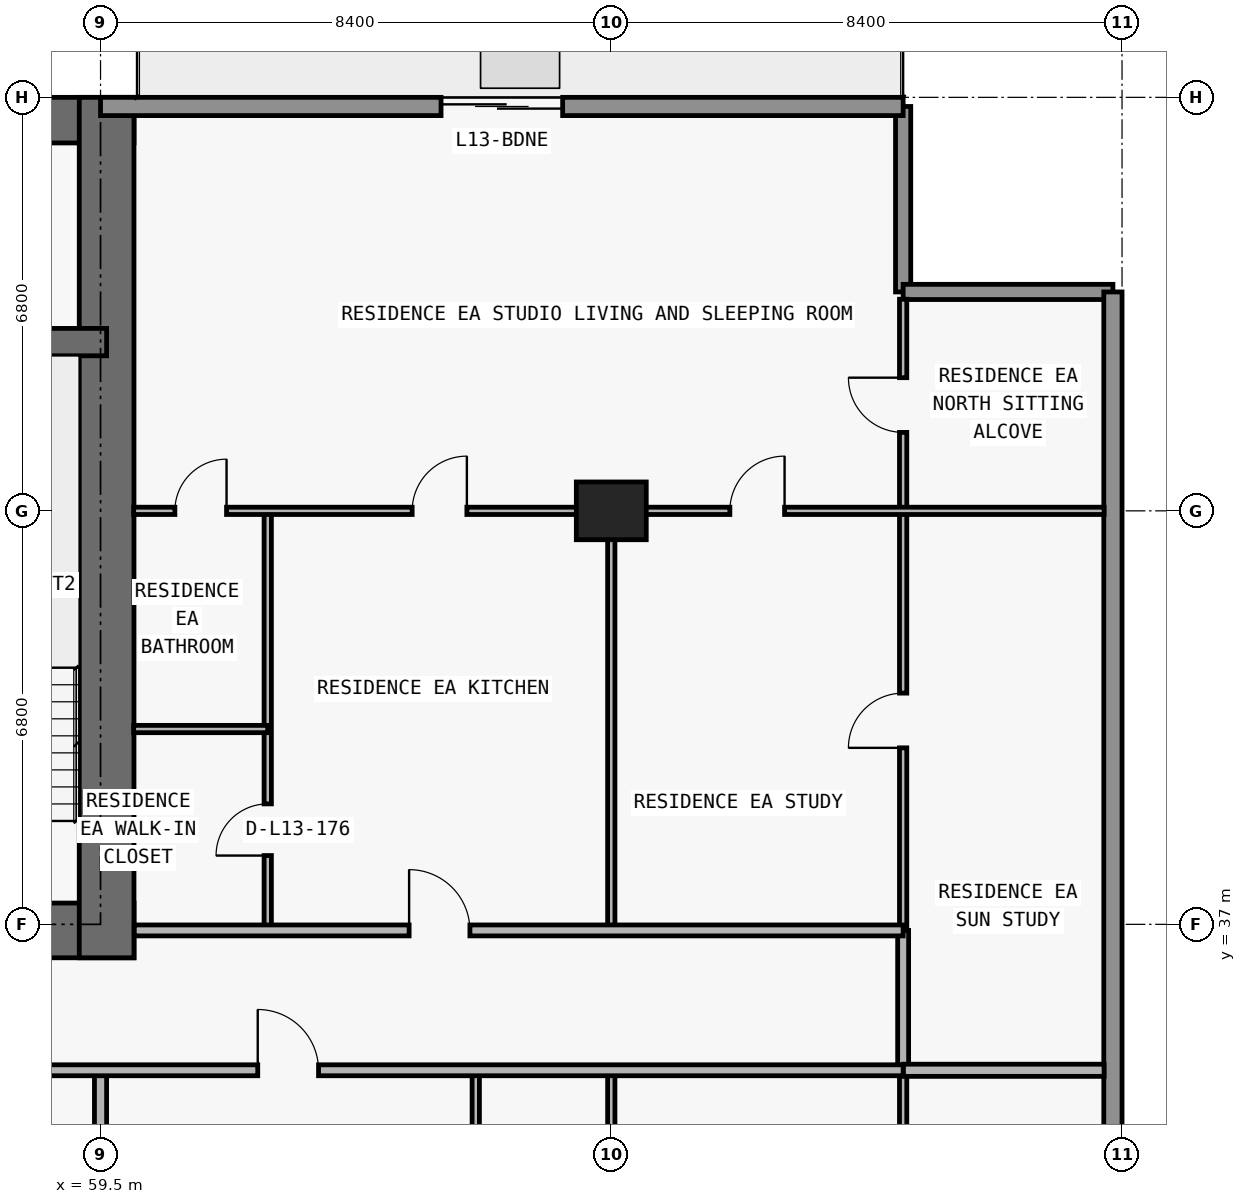
"""IFC4 building model, lengths in metres.
Left out: names, types, materials, properties, quantities, classifications, styles, units other than length and angle.
Written with IfcOpenShell. Run it as: python <this file> out.ifc"""

import sys

from ifc_helpers import new_model, si_unit, direction, frame, frame_2d, origin, origin_2d, place, context, subcontext, project, spatial, rectangle, extrude, element, fill, save


model = new_model("IFC4")
c1 = context("Model", 3, precision=1e-05, world=origin(), true_north=direction((0.0, 1.0)))
c2 = subcontext(c1, "Body", "Model", "MODEL_VIEW")
j1 = project(units=[si_unit("LENGTHUNIT", "METRE"), si_unit("PLANEANGLEUNIT", "RADIAN")], contexts=[c1])
p1 = place(None, origin())
s1 = spatial("IfcSite", under=j1, at=p1, CompositionType="ELEMENT")
p2 = place(p1, origin())
s2 = spatial("IfcBuilding", under=s1, at=p2, CompositionType="ELEMENT")
p3 = place(p2, frame((0.0, 0.0, 53.1)))
s3 = spatial("IfcBuildingStorey", under=s2, at=p3, CompositionType="ELEMENT", Elevation=53.1)
p4 = place(p3, frame((67.9, 43.8, 0.0), z_axis=(0.0, 0.0, 1.0), x_axis=(1.0, 0.0, 0.0)))
e1 = element("IfcColumn", 1, at=p4, inside=s3, PredefinedType="COLUMN", context=c2, shape_type="SweptSolid", body=[
    extrude(rectangle(XDim=1.15, YDim=0.95, at=origin_2d()), origin(), (0.0, 0.0, 1.0), 3.05),
])
p5 = place(p3, frame((17.75, 36.9, 0.0), z_axis=(0.0, 0.0, 1.0), x_axis=(1.0, 0.0, 0.0)))
e2 = element("IfcWall", 2, at=p5, inside=s3, PredefinedType="SHEAR", context=c2, shape_type="SweptSolid", body=[
    extrude(rectangle(XDim=42.3, YDim=0.9, at=frame_2d((21.15, 0.0))), origin(), (0.0, 0.0, 1.0), 3.05),
])
p6 = place(p5, frame((14.55, 0.0, 0.0)))
e3 = element("IfcOpeningElement", 3, at=p6, cuts=e2, PredefinedType="OPENING", context=c2, shape_type="SweptSolid", body=[
    extrude(rectangle(XDim=1.1, YDim=2.15, at=frame_2d((0.55, 1.075))), frame((0.0, 0.46, 0.0), z_axis=(0.0, -1.0, 0.0), x_axis=(1.0, 0.0, 0.0)), (0.0, 0.0, 1.0), 0.92),
])
p7 = place(p5, frame((6.4, 0.0, 0.0)))
e4 = element("IfcOpeningElement", 4, at=p7, cuts=e2, PredefinedType="OPENING", context=c2, shape_type="SweptSolid", body=[
    extrude(rectangle(XDim=1.05, YDim=2.15, at=frame_2d((0.525, 1.075))), frame((0.0, 0.46, 0.0), z_axis=(0.0, -1.0, 0.0), x_axis=(1.0, 0.0, 0.0)), (0.0, 0.0, 1.0), 0.92),
])
p8 = place(p5, frame((34.9, 0.0, 0.0)))
e5 = element("IfcOpeningElement", 5, at=p8, cuts=e2, PredefinedType="OPENING", context=c2, shape_type="SweptSolid", body=[
    extrude(rectangle(XDim=1.05, YDim=2.15, at=frame_2d((0.525, 1.075))), frame((0.0, 0.46, 0.0), z_axis=(0.0, -1.0, 0.0), x_axis=(1.0, 0.0, 0.0)), (0.0, 0.0, 1.0), 0.92),
])
p9 = place(p5, frame((11.012, 0.0, 0.0)))
e6 = element("IfcOpeningElement", 6, at=p9, cuts=e2, PredefinedType="OPENING", context=c2, shape_type="SweptSolid", body=[
    extrude(rectangle(XDim=1.05, YDim=2.15, at=frame_2d((0.525, 1.075))), frame((0.0, 0.46, 0.0), z_axis=(0.0, -1.0, 0.0), x_axis=(1.0, 0.0, 0.0)), (0.0, 0.0, 1.0), 0.92),
])
p10 = place(p5, frame((24.25, 0.0, 0.0)))
e7 = element("IfcOpeningElement", 7, at=p10, cuts=e2, PredefinedType="OPENING", context=c2, shape_type="SweptSolid", body=[
    extrude(rectangle(XDim=1.05, YDim=2.15, at=frame_2d((0.525, 1.075))), frame((0.0, 0.46, 0.0), z_axis=(0.0, -1.0, 0.0), x_axis=(1.0, 0.0, 0.0)), (0.0, 0.0, 1.0), 0.92),
])
p11 = place(p3, frame((17.75, 50.225, 0.0), z_axis=(0.0, 0.0, 1.0), x_axis=(1.0, 0.0, 0.0)))
e8 = element("IfcWall", 8, at=p11, inside=s3, PredefinedType="SHEAR", context=c2, shape_type="SweptSolid", body=[
    extrude(rectangle(XDim=42.3, YDim=0.75, at=frame_2d((21.15, 0.0))), origin(), (0.0, 0.0, 1.0), 3.05),
])
p12 = place(p3, frame((59.6, 36.45, 0.0), z_axis=(0.0, 0.0, 1.0), x_axis=(0.0, 1.0, 0.0)))
e9 = element("IfcWall", 9, at=p12, inside=s3, PredefinedType="SHEAR", context=c2, shape_type="SweptSolid", body=[
    extrude(rectangle(XDim=14.15, YDim=0.9, at=frame_2d((7.075, 0.0))), origin(), (0.0, 0.0, 1.0), 3.05),
])
p13 = place(p3, frame((18.2, 46.575, 0.0), z_axis=(0.0, 0.0, 1.0), x_axis=(1.0, 0.0, 0.0)))
e10 = element("IfcWall", 10, at=p13, inside=s3, PredefinedType="SHEAR", context=c2, shape_type="SweptSolid", body=[
    extrude(rectangle(XDim=41.4, YDim=0.45, at=frame_2d((20.7, 0.0))), origin(), (0.0, 0.0, 1.0), 3.05),
])
p14 = place(p13, frame((7.675, 0.0, 0.0)))
e11 = element("IfcOpeningElement", 11, at=p14, cuts=e10, PredefinedType="OPENING", context=c2, shape_type="SweptSolid", body=[
    extrude(rectangle(XDim=1.05, YDim=2.15, at=frame_2d((0.525, 1.075))), frame((0.0, 0.235, 0.0), z_axis=(0.0, -1.0, 0.0), x_axis=(1.0, 0.0, 0.0)), (0.0, 0.0, 1.0), 0.47),
])
p15 = place(p13, frame((32.725, 0.0, 0.0)))
e12 = element("IfcOpeningElement", 12, at=p15, cuts=e10, PredefinedType="OPENING", context=c2, shape_type="SweptSolid", body=[
    extrude(rectangle(XDim=1.05, YDim=2.15, at=frame_2d((0.525, 1.075))), frame((0.0, 0.235, 0.0), z_axis=(0.0, -1.0, 0.0), x_axis=(1.0, 0.0, 0.0)), (0.0, 0.0, 1.0), 0.47),
])
p16 = place(p3, frame((72.7, 50.45, 0.0), z_axis=(0.0, 0.0, 1.0), x_axis=(0.0, -1.0, 0.0)))
e13 = element("IfcWall", 13, at=p16, inside=s3, PredefinedType="ELEMENTEDWALL", context=c2, shape_type="SweptSolid", body=[
    extrude(rectangle(XDim=3.05, YDim=0.25, at=frame_2d((1.525, 0.0))), origin(), (0.0, 0.0, 1.0), 3.05),
])
p17 = place(p3, frame((72.7, 47.4, 0.0), z_axis=(0.0, 0.0, 1.0), x_axis=(1.0, 0.0, 0.0)))
e14 = element("IfcWall", 14, at=p17, inside=s3, PredefinedType="ELEMENTEDWALL", context=c2, shape_type="SweptSolid", body=[
    extrude(rectangle(XDim=3.45, YDim=0.25, at=frame_2d((1.725, 0.0))), origin(), (0.0, 0.0, 1.0), 3.05),
])
p18 = place(p3, frame((76.15, 47.4, 0.0), z_axis=(0.0, 0.0, 1.0), x_axis=(0.0, -1.0, 0.0)))
e15 = element("IfcWall", 15, at=p18, inside=s3, PredefinedType="STANDARD", context=c2, shape_type="SweptSolid", body=[
    extrude(rectangle(XDim=20.6, YDim=0.3, at=frame_2d((10.3, 0.0))), origin(), (0.0, 0.0, 1.0), 3.05),
])
p19 = place(p3, frame((59.5, 50.45, 0.0), z_axis=(0.0, 0.0, 1.0), x_axis=(1.0, 0.0, 0.0)))
e16 = element("IfcWall", 16, at=p19, inside=s3, PredefinedType="STANDARD", context=c2, shape_type="SweptSolid", body=[
    extrude(rectangle(XDim=13.2, YDim=0.3, at=frame_2d((6.6, 0.0))), origin(), (0.0, 0.0, 1.0), 3.05),
])
p20 = place(p19, frame((5.6, 0.0, 0.0)))
e17 = element("IfcOpeningElement", 17, at=p20, cuts=e16, PredefinedType="OPENING", context=c2, shape_type="SweptSolid", body=[
    extrude(rectangle(XDim=2.0, YDim=2.3, at=frame_2d((1.0, 1.15))), frame((0.0, 0.16, 0.0), z_axis=(0.0, -1.0, 0.0), x_axis=(1.0, 0.0, 0.0)), (0.0, 0.0, 1.0), 0.32),
])
p21 = place(p3, frame((59.5, 30.04, 0.0), z_axis=(0.0, 0.0, 1.0), x_axis=(0.0, 1.0, 0.0)))
e18 = element("IfcWall", 18, at=p21, inside=s3, PredefinedType="PARTITIONING", context=c2, shape_type="SweptSolid", body=[
    extrude(rectangle(XDim=4.56, YDim=0.2, at=frame_2d((2.28, 0.0))), origin(), (0.0, 0.0, 1.0), 2.11),
])
p22 = place(p3, frame((62.25, 36.9, 0.0), z_axis=(0.0, 0.0, 1.0), x_axis=(0.0, 1.0, 0.0)))
e19 = element("IfcWall", 19, at=p22, inside=s3, PredefinedType="PARTITIONING", context=c2, shape_type="SweptSolid", body=[
    extrude(rectangle(XDim=6.9, YDim=0.12, at=frame_2d((3.45, 0.0))), origin(), (0.0, 0.0, 1.0), 3.05),
])
p23 = place(p22, frame((1.231, 0.0, 0.0)))
e20 = element("IfcOpeningElement", 20, at=p23, cuts=e19, PredefinedType="OPENING", context=c2, shape_type="SweptSolid", body=[
    extrude(rectangle(XDim=0.85, YDim=2.1, at=frame_2d((0.425, 1.05))), frame((0.0, 0.07, 0.0), z_axis=(0.0, -1.0, 0.0), x_axis=(1.0, 0.0, 0.0)), (0.0, 0.0, 1.0), 0.14),
])
p24 = place(p3, frame((65.671, 30.04, 0.0), z_axis=(0.0, 0.0, 1.0), x_axis=(0.0, 1.0, 0.0)))
e21 = element("IfcWall", 21, at=p24, inside=s3, PredefinedType="PARTITIONING", context=c2, shape_type="SweptSolid", body=[
    extrude(rectangle(XDim=4.56, YDim=0.12, at=frame_2d((2.28, 0.0))), origin(), (0.0, 0.0, 1.0), 2.578),
])
p25 = place(p24, frame((1.855, 0.0, 0.0)))
e22 = element("IfcOpeningElement", 22, at=p25, cuts=e21, PredefinedType="OPENING", context=c2, shape_type="SweptSolid", body=[
    extrude(rectangle(XDim=0.85, YDim=2.1, at=frame_2d((0.425, 1.05))), frame((0.0, 0.07, 0.0), z_axis=(0.0, -1.0, 0.0), x_axis=(1.0, 0.0, 0.0)), (0.0, 0.0, 1.0), 0.14),
])
p26 = place(p3, frame((67.9, 30.04, 0.0), z_axis=(0.0, 0.0, 1.0), x_axis=(0.0, 1.0, 0.0)))
e23 = element("IfcWall", 23, at=p26, inside=s3, PredefinedType="PARTITIONING", context=c2, shape_type="SweptSolid", body=[
    extrude(rectangle(XDim=4.56, YDim=0.12, at=frame_2d((2.28, 0.0))), origin(), (0.0, 0.0, 1.0), 2.11),
])
p27 = place(p3, frame((67.9, 36.9, 0.0), z_axis=(0.0, 0.0, 1.0), x_axis=(0.0, 1.0, 0.0)))
e24 = element("IfcWall", 24, at=p27, inside=s3, PredefinedType="PARTITIONING", context=c2, shape_type="SweptSolid", body=[
    extrude(rectangle(XDim=6.9, YDim=0.12, at=frame_2d((3.45, 0.0))), origin(), (0.0, 0.0, 1.0), 2.11),
])
p28 = place(p3, frame((72.7, 30.04, 0.0), z_axis=(0.0, 0.0, 1.0), x_axis=(0.0, 1.0, 0.0)))
e25 = element("IfcWall", 25, at=p28, inside=s3, PredefinedType="PARTITIONING", context=c2, shape_type="SweptSolid", body=[
    extrude(rectangle(XDim=4.56, YDim=0.12, at=frame_2d((2.28, 0.0))), origin(), (0.0, 0.0, 1.0), 3.05),
])
p29 = place(p3, frame((72.7, 34.605, 0.0), z_axis=(0.0, 0.0, 1.0), x_axis=(0.0, 1.0, 0.0)))
e26 = element("IfcWall", 26, at=p29, inside=s3, PredefinedType="PARTITIONING", context=c2, shape_type="SweptSolid", body=[
    extrude(rectangle(XDim=2.295, YDim=0.18, at=frame_2d((1.147, 0.0))), origin(), (0.0, 0.0, 1.0), 3.05),
])
p30 = place(p3, frame((72.7, 36.905, 0.0), z_axis=(0.0, 0.0, 1.0), x_axis=(0.0, 1.0, 0.0)))
e27 = element("IfcWall", 27, at=p30, inside=s3, PredefinedType="PARTITIONING", context=c2, shape_type="SweptSolid", body=[
    extrude(rectangle(XDim=10.375, YDim=0.12, at=frame_2d((5.188, 0.0))), origin(), (0.0, 0.0, 1.0), 3.05),
])
p31 = place(p30, frame((2.998, 0.0, 0.0)))
e28 = element("IfcOpeningElement", 28, at=p31, cuts=e27, PredefinedType="OPENING", context=c2, shape_type="SweptSolid", body=[
    extrude(rectangle(XDim=0.9, YDim=2.15, at=frame_2d((0.45, 1.075))), frame((0.0, 0.07, 0.0), z_axis=(0.0, -1.0, 0.0), x_axis=(1.0, 0.0, 0.0)), (0.0, 0.0, 1.0), 0.14),
])
p32 = place(p30, frame((8.185, 0.0, 0.0)))
e29 = element("IfcOpeningElement", 29, at=p32, cuts=e27, PredefinedType="OPENING", context=c2, shape_type="SweptSolid", body=[
    extrude(rectangle(XDim=0.9, YDim=2.15, at=frame_2d((0.45, 1.075))), frame((0.0, 0.07, 0.0), z_axis=(0.0, -1.0, 0.0), x_axis=(1.0, 0.0, 0.0)), (0.0, 0.0, 1.0), 0.14),
])
p33 = place(p3, frame((5.105, 34.6, 0.0), z_axis=(0.0, 0.0, 1.0), x_axis=(1.0, 0.0, 0.0)))
e30 = element("IfcWall", 30, at=p33, inside=s3, PredefinedType="PARTITIONING", context=c2, shape_type="SweptSolid", body=[
    extrude(rectangle(XDim=67.595, YDim=0.18, at=frame_2d((33.797, 0.0))), origin(), (0.0, 0.0, 1.0), 3.05),
])
p34 = place(p33, frame((7.365, 0.0, 0.0)))
e31 = element("IfcOpeningElement", 31, at=p34, cuts=e30, PredefinedType="OPENING", context=c2, shape_type="SweptSolid", body=[
    extrude(rectangle(XDim=1.0, YDim=2.2, at=frame_2d((0.5, 1.1))), frame((0.0, 0.1, 0.0), z_axis=(0.0, -1.0, 0.0), x_axis=(1.0, 0.0, 0.0)), (0.0, 0.0, 1.0), 0.2),
])
p35 = place(p33, frame((15.927, 0.0, 0.0)))
e32 = element("IfcOpeningElement", 32, at=p35, cuts=e30, PredefinedType="OPENING", context=c2, shape_type="SweptSolid", body=[
    extrude(rectangle(XDim=1.0, YDim=2.2, at=frame_2d((0.5, 1.1))), frame((0.0, 0.1, 0.0), z_axis=(0.0, -1.0, 0.0), x_axis=(1.0, 0.0, 0.0)), (0.0, 0.0, 1.0), 0.2),
])
p36 = place(p33, frame((24.407, 0.0, 0.0)))
e33 = element("IfcOpeningElement", 33, at=p36, cuts=e30, PredefinedType="OPENING", context=c2, shape_type="SweptSolid", body=[
    extrude(rectangle(XDim=1.0, YDim=2.2, at=frame_2d((0.5, 1.1))), frame((0.0, 0.1, 0.0), z_axis=(0.0, -1.0, 0.0), x_axis=(1.0, 0.0, 0.0)), (0.0, 0.0, 1.0), 0.2),
])
p37 = place(p33, frame((48.739, 0.0, 0.0)))
e34 = element("IfcOpeningElement", 34, at=p37, cuts=e30, PredefinedType="OPENING", context=c2, shape_type="SweptSolid", body=[
    extrude(rectangle(XDim=1.0, YDim=2.2, at=frame_2d((0.5, 1.1))), frame((0.0, 0.1, 0.0), z_axis=(0.0, -1.0, 0.0), x_axis=(1.0, 0.0, 0.0)), (0.0, 0.0, 1.0), 0.2),
])
p38 = place(p33, frame((56.98, 0.0, 0.0)))
e35 = element("IfcOpeningElement", 35, at=p38, cuts=e30, PredefinedType="OPENING", context=c2, shape_type="SweptSolid", body=[
    extrude(rectangle(XDim=1.0, YDim=2.2, at=frame_2d((0.5, 1.1))), frame((0.0, 0.1, 0.0), z_axis=(0.0, -1.0, 0.0), x_axis=(1.0, 0.0, 0.0)), (0.0, 0.0, 1.0), 0.2),
])
p39 = place(p3, frame((72.705, 34.6, 0.0), z_axis=(0.0, 0.0, 1.0), x_axis=(1.0, 0.0, 0.0)))
e36 = element("IfcWall", 36, at=p39, inside=s3, PredefinedType="PARTITIONING", context=c2, shape_type="SweptSolid", body=[
    extrude(rectangle(XDim=3.3, YDim=0.2, at=frame_2d((1.65, 0.0))), origin(), (0.0, 0.0, 1.0), 3.05),
])
p40 = place(p3, frame((60.055, 36.9, 0.0), z_axis=(0.0, 0.0, 1.0), x_axis=(1.0, 0.0, 0.0)))
e37 = element("IfcWall", 37, at=p40, inside=s3, PredefinedType="PARTITIONING", context=c2, shape_type="SweptSolid", body=[
    extrude(rectangle(XDim=12.645, YDim=0.18, at=frame_2d((6.323, 0.0))), origin(), (0.0, 0.0, 1.0), 3.05),
])
p41 = place(p40, frame((4.52, 0.0, 0.0)))
e38 = element("IfcOpeningElement", 38, at=p41, cuts=e37, PredefinedType="OPENING", context=c2, shape_type="SweptSolid", body=[
    extrude(rectangle(XDim=1.0, YDim=2.2, at=frame_2d((0.5, 1.1))), frame((0.0, 0.1, 0.0), z_axis=(0.0, -1.0, 0.0), x_axis=(1.0, 0.0, 0.0)), (0.0, 0.0, 1.0), 0.2),
])
p42 = place(p3, frame((60.045, 40.212, 0.0), z_axis=(0.0, 0.0, 1.0), x_axis=(1.0, 0.0, 0.0)))
e39 = element("IfcWall", 39, at=p42, inside=s3, PredefinedType="PARTITIONING", context=c2, shape_type="SweptSolid", body=[
    extrude(rectangle(XDim=2.205, YDim=0.12, at=frame_2d((1.103, 0.0))), origin(), (0.0, 0.0, 1.0), 3.05),
])
p43 = place(p3, frame((60.045, 43.8, 0.0), z_axis=(0.0, 0.0, 1.0), x_axis=(1.0, 0.0, 0.0)))
e40 = element("IfcWall", 40, at=p43, inside=s3, PredefinedType="PARTITIONING", context=c2, shape_type="SweptSolid", body=[
    extrude(rectangle(XDim=15.96, YDim=0.12, at=frame_2d((7.98, 0.0))), origin(), (0.0, 0.0, 1.0), 2.339),
])
p44 = place(p43, frame((9.805, 0.0, 0.0)))
e41 = element("IfcOpeningElement", 41, at=p44, cuts=e40, PredefinedType="OPENING", context=c2, shape_type="SweptSolid", body=[
    extrude(rectangle(XDim=0.9, YDim=2.15, at=frame_2d((0.45, 1.075))), frame((0.0, 0.07, 0.0), z_axis=(0.0, -1.0, 0.0), x_axis=(1.0, 0.0, 0.0)), (0.0, 0.0, 1.0), 0.14),
])
p45 = place(p43, frame((4.58, 0.0, 0.0)))
e42 = element("IfcOpeningElement", 42, at=p45, cuts=e40, PredefinedType="OPENING", context=c2, shape_type="SweptSolid", body=[
    extrude(rectangle(XDim=0.9, YDim=2.15, at=frame_2d((0.45, 1.075))), frame((0.0, 0.07, 0.0), z_axis=(0.0, -1.0, 0.0), x_axis=(1.0, 0.0, 0.0)), (0.0, 0.0, 1.0), 0.14),
])
p46 = place(p43, frame((0.677, 0.0, 0.0)))
e43 = element("IfcOpeningElement", 43, at=p46, cuts=e40, PredefinedType="OPENING", context=c2, shape_type="SweptSolid", body=[
    extrude(rectangle(XDim=0.85, YDim=2.1, at=frame_2d((0.425, 1.05))), frame((0.0, 0.07, 0.0), z_axis=(0.0, -1.0, 0.0), x_axis=(1.0, 0.0, 0.0)), (0.0, 0.0, 1.0), 0.14),
])
p47 = place(p20, origin())
e44 = element("IfcDoor", 44, at=p47, inside=s3, OperationType="DOUBLE_DOOR_SLIDING", PredefinedType="DOOR", context=c2, shape_type="SweptSolid", body=[
    extrude(rectangle(XDim=2.0, YDim=2.3, at=frame_2d((1.0, 1.15))), frame((0.0, 0.025, 0.0), z_axis=(0.0, -1.0, 0.0), x_axis=(1.0, 0.0, 0.0)), (0.0, 0.0, 1.0), 0.05),
])
fill(e17, e44)
p48 = place(p38, origin())
e45 = element("IfcDoor", 45, at=p48, inside=s3, OperationType="SINGLE_SWING_LEFT", PredefinedType="DOOR", context=c2, shape_type="SweptSolid", body=[
    extrude(rectangle(XDim=1.0, YDim=2.2, at=frame_2d((0.5, 1.1))), frame((0.0, 0.025, 0.0), z_axis=(0.0, -1.0, 0.0), x_axis=(1.0, 0.0, 0.0)), (0.0, 0.0, 1.0), 0.05),
])
fill(e35, e45)
p49 = place(p44, origin())
e46 = element("IfcDoor", 46, at=p49, inside=s3, OperationType="SINGLE_SWING_RIGHT", PredefinedType="DOOR", context=c2, shape_type="SweptSolid", body=[
    extrude(rectangle(XDim=0.9, YDim=2.15, at=frame_2d((0.45, 1.075))), frame((0.0, 0.025, 0.0), z_axis=(0.0, -1.0, 0.0), x_axis=(1.0, 0.0, 0.0)), (0.0, 0.0, 1.0), 0.05),
])
fill(e41, e46)
p50 = place(p41, origin())
e47 = element("IfcDoor", 47, at=p50, inside=s3, OperationType="SINGLE_SWING_LEFT", PredefinedType="DOOR", context=c2, shape_type="SweptSolid", body=[
    extrude(rectangle(XDim=1.0, YDim=2.2, at=frame_2d((0.5, 1.1))), frame((0.0, 0.025, 0.0), z_axis=(0.0, -1.0, 0.0), x_axis=(1.0, 0.0, 0.0)), (0.0, 0.0, 1.0), 0.05),
])
fill(e38, e47)
p51 = place(p45, origin())
e48 = element("IfcDoor", 48, at=p51, inside=s3, OperationType="SINGLE_SWING_RIGHT", PredefinedType="DOOR", context=c2, shape_type="SweptSolid", body=[
    extrude(rectangle(XDim=0.9, YDim=2.15, at=frame_2d((0.45, 1.075))), frame((0.0, 0.025, 0.0), z_axis=(0.0, -1.0, 0.0), x_axis=(1.0, 0.0, 0.0)), (0.0, 0.0, 1.0), 0.05),
])
fill(e42, e48)
p52 = place(p23, origin())
e49 = element("IfcDoor", 49, at=p52, inside=s3, OperationType="SINGLE_SWING_LEFT", PredefinedType="DOOR", context=c2, shape_type="SweptSolid", body=[
    extrude(rectangle(XDim=0.85, YDim=2.1, at=frame_2d((0.425, 1.05))), frame((0.0, 0.025, 0.0), z_axis=(0.0, -1.0, 0.0), x_axis=(1.0, 0.0, 0.0)), (0.0, 0.0, 1.0), 0.05),
])
fill(e20, e49)
p53 = place(p46, origin())
e50 = element("IfcDoor", 50, at=p53, inside=s3, OperationType="SINGLE_SWING_RIGHT", PredefinedType="DOOR", context=c2, shape_type="SweptSolid", body=[
    extrude(rectangle(XDim=0.85, YDim=2.1, at=frame_2d((0.425, 1.05))), frame((0.0, 0.025, 0.0), z_axis=(0.0, -1.0, 0.0), x_axis=(1.0, 0.0, 0.0)), (0.0, 0.0, 1.0), 0.05),
])
fill(e43, e50)
p54 = place(p31, origin())
e51 = element("IfcDoor", 51, at=p54, inside=s3, OperationType="SINGLE_SWING_LEFT", PredefinedType="DOOR", context=c2, shape_type="SweptSolid", body=[
    extrude(rectangle(XDim=0.9, YDim=2.15, at=frame_2d((0.45, 1.075))), frame((0.0, 0.025, 0.0), z_axis=(0.0, -1.0, 0.0), x_axis=(1.0, 0.0, 0.0)), (0.0, 0.0, 1.0), 0.05),
])
fill(e28, e51)
p55 = place(p32, origin())
e52 = element("IfcDoor", 52, at=p55, inside=s3, OperationType="SINGLE_SWING_RIGHT", PredefinedType="DOOR", context=c2, shape_type="SweptSolid", body=[
    extrude(rectangle(XDim=0.9, YDim=2.15, at=frame_2d((0.45, 1.075))), frame((0.0, 0.025, 0.0), z_axis=(0.0, -1.0, 0.0), x_axis=(1.0, 0.0, 0.0)), (0.0, 0.0, 1.0), 0.05),
])
fill(e29, e52)
save(model, sys.argv[1])
